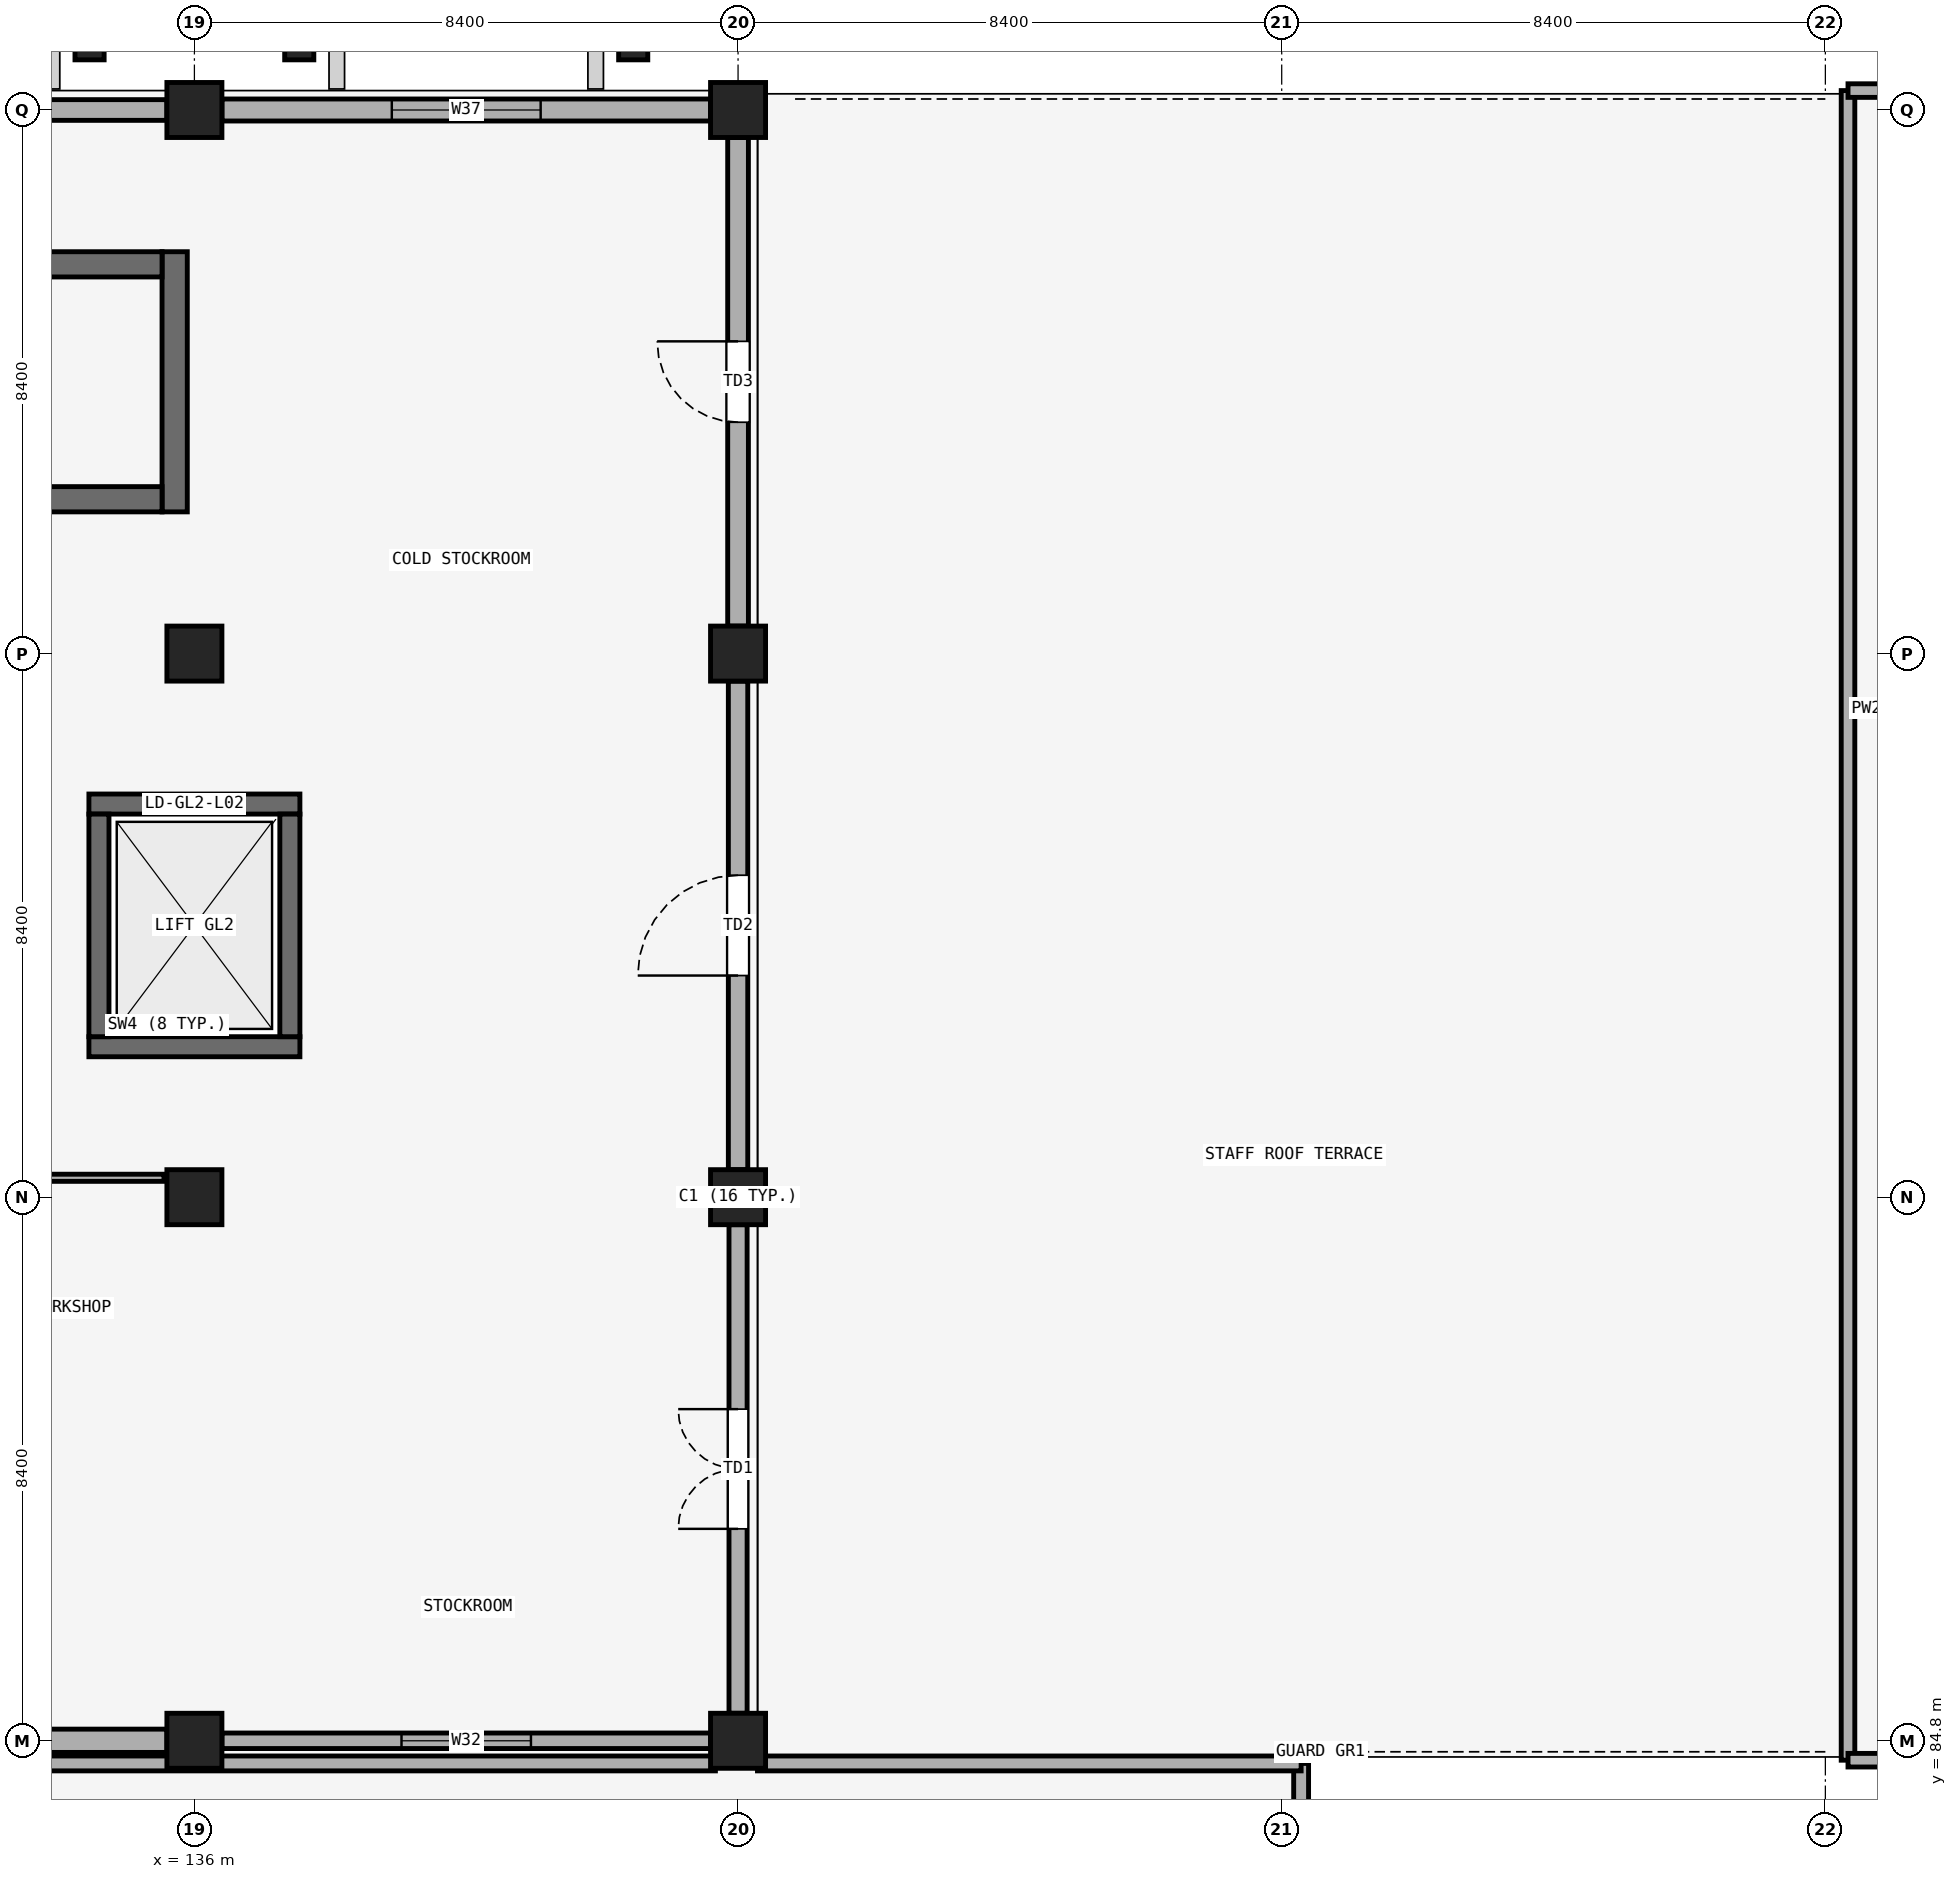
"""IFC4 building model, lengths in metres.
Left out: names, types, materials, properties, quantities, classifications, styles, units other than length and angle.
Written with IfcOpenShell. Run it as: python <this file> out.ifc"""

import sys

from ifc_helpers import new_model, si_unit, direction, frame, frame_2d, origin, origin_2d, place, context, subcontext, project, spatial, rectangle, extrude, element, fill, save


model = new_model("IFC4")
c1 = context("Model", 3, precision=1e-05, world=origin(), true_north=direction((0.0, 1.0)))
c2 = subcontext(c1, "Body", "Model", "MODEL_VIEW")
j1 = project(units=[si_unit("LENGTHUNIT", "METRE"), si_unit("PLANEANGLEUNIT", "RADIAN")], contexts=[c1])
p1 = place(None, origin())
s1 = spatial("IfcSite", under=j1, at=p1, CompositionType="ELEMENT")
p2 = place(p1, origin())
s2 = spatial("IfcBuilding", under=s1, at=p2, CompositionType="ELEMENT")
p3 = place(p2, frame((0.0, 0.0, 9.9)))
s3 = spatial("IfcBuildingStorey", under=s2, at=p3, CompositionType="ELEMENT", Elevation=9.9)
for number, where, z_axis, x_axis in (
    (1, (136.0, 84.8, 0.0), (0.0, 0.0, 1.0), (1.0, 0.0, 0.0)),
    (2, (144.4, 84.8, 0.0), (0.0, 0.0, 1.0), (1.0, 0.0, 0.0)),
    (3, (136.0, 93.2, 0.0), (0.0, 0.0, 1.0), (1.0, 0.0, 0.0)),
    (4, (144.4, 93.2, 0.0), (0.0, 0.0, 1.0), (1.0, 0.0, 0.0)),
    (5, (136.0, 101.6, 0.0), (0.0, 0.0, 1.0), (1.0, 0.0, 0.0)),
    (6, (144.4, 101.6, 0.0), (0.0, 0.0, 1.0), (1.0, 0.0, 0.0)),
    (7, (136.0, 110.0, 0.0), (0.0, 0.0, 1.0), (1.0, 0.0, 0.0)),
    (8, (144.4, 110.0, 0.0), (0.0, 0.0, 1.0), (1.0, 0.0, 0.0)),
):
    element("IfcColumn", number, at=place(p3, frame(where, z_axis=z_axis, x_axis=x_axis)), inside=s3, PredefinedType="COLUMN", context=c2, shape_type="SweptSolid", body=[
        extrude(rectangle(XDim=0.85, YDim=0.85, at=origin_2d()), origin(), (0.0, 0.0, 1.0), 4.5),
    ])
for number, where, z_axis, x_axis in (
    (9, (134.38, 111.05, 0.0), (0.0, 0.0, 1.0), (1.0, 0.0, 0.0)),
    (10, (137.62, 111.05, 0.0), (0.0, 0.0, 1.0), (1.0, 0.0, 0.0)),
    (11, (142.78, 111.05, 0.0), (0.0, 0.0, 1.0), (1.0, 0.0, 0.0)),
):
    element("IfcColumn", number, at=place(p3, frame(where, z_axis=z_axis, x_axis=x_axis)), inside=s3, PredefinedType="PILASTER", context=c2, shape_type="SweptSolid", body=[
        extrude(rectangle(XDim=0.45, YDim=0.55, at=origin_2d()), origin(), (0.0, 0.0, 1.0), 4.5),
    ])
p4 = place(p3, frame((128.025, 84.8, 0.0), z_axis=(0.0, 0.0, 1.0), x_axis=(1.0, 0.0, 0.0)))
e12 = element("IfcWall", 12, at=p4, inside=s3, PredefinedType="SOLIDWALL", context=c2, shape_type="SweptSolid", body=[
    extrude(rectangle(XDim=7.55, YDim=0.36, at=frame_2d((3.775, 0.0))), origin(), (0.0, 0.0, 1.0), 3.45),
])
p5 = place(p4, frame((2.775, 0.0, 0.95)))
e13 = element("IfcOpeningElement", 13, at=p5, cuts=e12, PredefinedType="OPENING", context=c2, shape_type="SweptSolid", body=[
    extrude(rectangle(XDim=2.0, YDim=1.85, at=frame_2d((1.0, 0.925))), frame((0.0, 0.19, 0.0), z_axis=(0.0, -1.0, 0.0), x_axis=(1.0, 0.0, 0.0)), (0.0, 0.0, 1.0), 0.38),
])
p6 = place(p3, frame((136.425, 84.8, 0.0), z_axis=(0.0, 0.0, 1.0), x_axis=(1.0, 0.0, 0.0)))
e14 = element("IfcWall", 14, at=p6, inside=s3, PredefinedType="SOLIDWALL", context=c2, shape_type="SweptSolid", body=[
    extrude(rectangle(XDim=7.55, YDim=0.24, at=frame_2d((3.775, 0.0))), origin(), (0.0, 0.0, 1.0), 3.45),
])
p7 = place(p6, frame((2.775, 0.0, 0.95)))
e15 = element("IfcOpeningElement", 15, at=p7, cuts=e14, PredefinedType="OPENING", context=c2, shape_type="SweptSolid", body=[
    extrude(rectangle(XDim=2.0, YDim=2.1, at=frame_2d((1.0, 1.05))), frame((0.0, 0.13, 0.0), z_axis=(0.0, -1.0, 0.0), x_axis=(1.0, 0.0, 0.0)), (0.0, 0.0, 1.0), 0.26),
])
p8 = place(p3, frame((128.025, 110.0, 0.0), z_axis=(0.0, 0.0, 1.0), x_axis=(1.0, 0.0, 0.0)))
e16 = element("IfcWall", 16, at=p8, inside=s3, PredefinedType="SOLIDWALL", context=c2, shape_type="SweptSolid", body=[
    extrude(rectangle(XDim=7.55, YDim=0.32, at=frame_2d((3.775, 0.0))), origin(), (0.0, 0.0, 1.0), 3.45),
])
p9 = place(p8, frame((2.7, 0.0, 0.95)))
e17 = element("IfcOpeningElement", 17, at=p9, cuts=e16, PredefinedType="OPENING", context=c2, shape_type="SweptSolid", body=[
    extrude(rectangle(XDim=2.15, YDim=2.1, at=frame_2d((1.075, 1.05))), frame((0.0, 0.17, 0.0), z_axis=(0.0, -1.0, 0.0), x_axis=(1.0, 0.0, 0.0)), (0.0, 0.0, 1.0), 0.34),
])
p10 = place(p3, frame((136.425, 110.0, 0.0), z_axis=(0.0, 0.0, 1.0), x_axis=(1.0, 0.0, 0.0)))
e18 = element("IfcWall", 18, at=p10, inside=s3, PredefinedType="SOLIDWALL", context=c2, shape_type="SweptSolid", body=[
    extrude(rectangle(XDim=7.55, YDim=0.34, at=frame_2d((3.775, 0.0))), origin(), (0.0, 0.0, 1.0), 3.45),
])
p11 = place(p10, frame((2.625, 0.0, 0.95)))
e19 = element("IfcOpeningElement", 19, at=p11, cuts=e18, PredefinedType="OPENING", context=c2, shape_type="SweptSolid", body=[
    extrude(rectangle(XDim=2.3, YDim=1.35, at=frame_2d((1.15, 0.675))), frame((0.0, 0.18, 0.0), z_axis=(0.0, -1.0, 0.0), x_axis=(1.0, 0.0, 0.0)), (0.0, 0.0, 1.0), 0.36),
])
p12 = place(p3, frame((144.4, 85.225, 0.0), z_axis=(0.0, 0.0, 1.0), x_axis=(0.0, 1.0, 0.0)))
e20 = element("IfcWall", 20, at=p12, inside=s3, PredefinedType="SOLIDWALL", context=c2, shape_type="SweptSolid", body=[
    extrude(rectangle(XDim=7.55, YDim=0.28, at=frame_2d((3.775, 0.0))), origin(), (0.0, 0.0, 1.0), 3.45),
])
p13 = place(p12, frame((2.85, 0.0, 0.0)))
e21 = element("IfcOpeningElement", 21, at=p13, cuts=e20, PredefinedType="OPENING", context=c2, shape_type="SweptSolid", body=[
    extrude(rectangle(XDim=1.85, YDim=2.3, at=frame_2d((0.925, 1.15))), frame((0.0, 0.15, 0.0), z_axis=(0.0, -1.0, 0.0), x_axis=(1.0, 0.0, 0.0)), (0.0, 0.0, 1.0), 0.3),
])
p14 = place(p3, frame((144.4, 93.625, 0.0), z_axis=(0.0, 0.0, 1.0), x_axis=(0.0, 1.0, 0.0)))
e22 = element("IfcWall", 22, at=p14, inside=s3, PredefinedType="SOLIDWALL", context=c2, shape_type="SweptSolid", body=[
    extrude(rectangle(XDim=7.55, YDim=0.3, at=frame_2d((3.775, 0.0))), origin(), (0.0, 0.0, 1.0), 3.45),
])
p15 = place(p14, frame((3.0, 0.0, 0.0)))
e23 = element("IfcOpeningElement", 23, at=p15, cuts=e22, PredefinedType="OPENING", context=c2, shape_type="SweptSolid", body=[
    extrude(rectangle(XDim=1.55, YDim=2.25, at=frame_2d((0.775, 1.125))), frame((0.0, 0.16, 0.0), z_axis=(0.0, -1.0, 0.0), x_axis=(1.0, 0.0, 0.0)), (0.0, 0.0, 1.0), 0.32),
])
p16 = place(p3, frame((144.4, 102.025, 0.0), z_axis=(0.0, 0.0, 1.0), x_axis=(0.0, 1.0, 0.0)))
e24 = element("IfcWall", 24, at=p16, inside=s3, PredefinedType="SOLIDWALL", context=c2, shape_type="SweptSolid", body=[
    extrude(rectangle(XDim=7.55, YDim=0.32, at=frame_2d((3.775, 0.0))), origin(), (0.0, 0.0, 1.0), 3.45),
])
p17 = place(p16, frame((3.15, 0.0, 0.0)))
e25 = element("IfcOpeningElement", 25, at=p17, cuts=e24, PredefinedType="OPENING", context=c2, shape_type="SweptSolid", body=[
    extrude(rectangle(XDim=1.25, YDim=2.2, at=frame_2d((0.625, 1.1))), frame((0.0, 0.17, 0.0), z_axis=(0.0, -1.0, 0.0), x_axis=(1.0, 0.0, 0.0)), (0.0, 0.0, 1.0), 0.34),
])
p18 = place(p3, frame((153.1, 76.1, 0.0), z_axis=(0.0, 0.0, 1.0), x_axis=(0.0, 1.0, 0.0)))
e26 = element("IfcWall", 26, at=p18, inside=s3, PredefinedType="PARAPET", context=c2, shape_type="SweptSolid", body=[
    extrude(rectangle(XDim=8.35, YDim=0.23, at=frame_2d((4.175, 0.0))), origin(), (0.0, 0.0, 1.0), 0.95),
])
p19 = place(p3, frame((153.1, 84.45, 0.0), z_axis=(0.0, 0.0, 1.0), x_axis=(-1.0, 0.0, 0.0)))
e27 = element("IfcWall", 27, at=p19, inside=s3, PredefinedType="PARAPET", context=c2, shape_type="SweptSolid", body=[
    extrude(rectangle(XDim=8.4, YDim=0.23, at=frame_2d((4.2, 0.0))), origin(), (0.0, 0.0, 1.0), 0.95),
])
p20 = place(p3, frame((144.05, 84.45, 0.0), z_axis=(0.0, 0.0, 1.0), x_axis=(-1.0, 0.0, 0.0)))
e28 = element("IfcWall", 28, at=p20, inside=s3, PredefinedType="PARAPET", context=c2, shape_type="SweptSolid", body=[
    extrude(rectangle(XDim=41.95, YDim=0.23, at=frame_2d((20.975, 0.0))), origin(), (0.0, 0.0, 1.0), 0.95),
])
p21 = place(p3, frame((161.55, 110.3, 0.0), z_axis=(0.0, 0.0, 1.0), x_axis=(0.0, -1.0, 0.0)))
e29 = element("IfcWall", 29, at=p21, inside=s3, PredefinedType="PARAPET", context=c2, shape_type="SweptSolid", body=[
    extrude(rectangle(XDim=25.8, YDim=0.21, at=frame_2d((12.9, 0.0))), origin(), (0.0, 0.0, 1.0), 0.95),
])
for number, where, z_axis, x_axis in (
    (30, (161.55, 84.5, 0.0), (0.0, 0.0, 1.0), (1.0, 0.0, 0.0)),
    (31, (169.9, 110.3, 0.0), (0.0, 0.0, 1.0), (-1.0, 0.0, 0.0)),
):
    element("IfcWall", number, at=place(p3, frame(where, z_axis=z_axis, x_axis=x_axis)), inside=s3, PredefinedType="PARAPET", context=c2, shape_type="SweptSolid", body=[
        extrude(rectangle(XDim=8.35, YDim=0.21, at=frame_2d((4.175, 0.0))), origin(), (0.0, 0.0, 1.0), 0.95),
    ])
p22 = place(p3, frame((135.695, 103.79, 0.0), z_axis=(0.0, 0.0, 1.0), x_axis=(0.0, 1.0, 0.0)))
e32 = element("IfcWall", 32, at=p22, inside=s3, PredefinedType="SHEAR", context=c2, shape_type="SweptSolid", body=[
    extrude(rectangle(XDim=4.02, YDim=0.39, at=frame_2d((2.01, 0.0))), origin(), (0.0, 0.0, 1.0), 4.2),
])
for number, where, z_axis, x_axis in (
    (33, (128.1, 103.985, 0.0), (0.0, 0.0, 1.0), (1.0, 0.0, 0.0)),
    (34, (128.1, 107.615, 0.0), (0.0, 0.0, 1.0), (1.0, 0.0, 0.0)),
):
    element("IfcWall", number, at=place(p3, frame(where, z_axis=z_axis, x_axis=x_axis)), inside=s3, PredefinedType="SHEAR", context=c2, shape_type="SweptSolid", body=[
        extrude(rectangle(XDim=7.4, YDim=0.39, at=frame_2d((3.7, 0.0))), origin(), (0.0, 0.0, 1.0), 4.2),
    ])
p23 = place(p3, frame((134.37, 95.525, 0.0), z_axis=(0.0, 0.0, 1.0), x_axis=(1.0, 0.0, 0.0)))
e35 = element("IfcWall", 35, at=p23, inside=s3, PredefinedType="SHEAR", context=c2, shape_type="SweptSolid", body=[
    extrude(rectangle(XDim=3.26, YDim=0.31, at=frame_2d((1.63, 0.0))), origin(), (0.0, 0.0, 1.0), 4.2),
])
p24 = place(p3, frame((134.37, 99.275, 0.0), z_axis=(0.0, 0.0, 1.0), x_axis=(1.0, 0.0, 0.0)))
e36 = element("IfcWall", 36, at=p24, inside=s3, PredefinedType="SHEAR", context=c2, shape_type="SweptSolid", body=[
    extrude(rectangle(XDim=3.26, YDim=0.31, at=frame_2d((1.63, 0.0))), origin(), (0.0, 0.0, 1.0), 4.2),
])
p25 = place(p24, frame((0.88, 0.0, 0.0)))
e37 = element("IfcOpeningElement", 37, at=p25, cuts=e36, PredefinedType="OPENING", context=c2, shape_type="SweptSolid", body=[
    extrude(rectangle(XDim=1.5, YDim=2.35, at=frame_2d((0.75, 1.175))), frame((0.0, 0.165, 0.0), z_axis=(0.0, -1.0, 0.0), x_axis=(1.0, 0.0, 0.0)), (0.0, 0.0, 1.0), 0.33),
])
for number, where, z_axis, x_axis in (
    (38, (134.525, 95.68, 0.0), (0.0, 0.0, 1.0), (0.0, 1.0, 0.0)),
    (39, (137.475, 95.68, 0.0), (0.0, 0.0, 1.0), (0.0, 1.0, 0.0)),
):
    element("IfcWall", number, at=place(p3, frame(where, z_axis=z_axis, x_axis=x_axis)), inside=s3, PredefinedType="SHEAR", context=c2, shape_type="SweptSolid", body=[
        extrude(rectangle(XDim=3.44, YDim=0.31, at=frame_2d((1.72, 0.0))), origin(), (0.0, 0.0, 1.0), 4.2),
    ])
p26 = place(p3, frame((125.27, 93.5, 0.0), z_axis=(0.0, 0.0, 1.0), x_axis=(1.0, 0.0, 0.0)))
e40 = element("IfcWall", 40, at=p26, inside=s3, PredefinedType="PARTITIONING", context=c2, shape_type="SweptSolid", body=[
    extrude(rectangle(XDim=10.26, YDim=0.11, at=frame_2d((5.13, 0.0))), origin(), (0.0, 0.0, 1.0), 3.5),
])
p27 = place(p26, frame((4.45, 0.0, 0.0)))
e41 = element("IfcOpeningElement", 41, at=p27, cuts=e40, PredefinedType="OPENING", context=c2, shape_type="SweptSolid", body=[
    extrude(rectangle(XDim=1.36, YDim=2.22, at=frame_2d((0.68, 1.11))), frame((0.0, 0.065, 0.0), z_axis=(0.0, -1.0, 0.0), x_axis=(1.0, 0.0, 0.0)), (0.0, 0.0, 1.0), 0.13),
])
p28 = place(p7, origin())
e42 = element("IfcWindow", 42, at=p28, inside=s3, PartitioningType="DOUBLE_PANEL_VERTICAL", PredefinedType="WINDOW", context=c2, shape_type="SweptSolid", body=[
    extrude(rectangle(XDim=2.0, YDim=2.1, at=frame_2d((1.0, 1.05))), frame((0.0, 0.03, 0.0), z_axis=(0.0, -1.0, 0.0), x_axis=(1.0, 0.0, 0.0)), (0.0, 0.0, 1.0), 0.06),
])
fill(e15, e42)
p29 = place(p11, origin())
e43 = element("IfcWindow", 43, at=p29, inside=s3, PartitioningType="DOUBLE_PANEL_VERTICAL", PredefinedType="WINDOW", context=c2, shape_type="SweptSolid", body=[
    extrude(rectangle(XDim=2.3, YDim=1.35, at=frame_2d((1.15, 0.675))), frame((0.0, 0.03, 0.0), z_axis=(0.0, -1.0, 0.0), x_axis=(1.0, 0.0, 0.0)), (0.0, 0.0, 1.0), 0.06),
])
fill(e19, e43)
p30 = place(p13, origin())
e44 = element("IfcDoor", 44, at=p30, inside=s3, OperationType="DOUBLE_DOOR_SINGLE_SWING", PredefinedType="DOOR", context=c2, shape_type="SweptSolid", body=[
    extrude(rectangle(XDim=1.85, YDim=2.3, at=frame_2d((0.925, 1.15))), frame((0.0, 0.025, 0.0), z_axis=(0.0, -1.0, 0.0), x_axis=(1.0, 0.0, 0.0)), (0.0, 0.0, 1.0), 0.05),
])
fill(e21, e44)
p31 = place(p15, origin())
e45 = element("IfcDoor", 45, at=p31, inside=s3, OperationType="SINGLE_SWING_LEFT", PredefinedType="DOOR", context=c2, shape_type="SweptSolid", body=[
    extrude(rectangle(XDim=1.55, YDim=2.25, at=frame_2d((0.775, 1.125))), frame((0.0, 0.025, 0.0), z_axis=(0.0, -1.0, 0.0), x_axis=(1.0, 0.0, 0.0)), (0.0, 0.0, 1.0), 0.05),
])
fill(e23, e45)
p32 = place(p17, origin())
e46 = element("IfcDoor", 46, at=p32, inside=s3, OperationType="SINGLE_SWING_RIGHT", PredefinedType="DOOR", context=c2, shape_type="SweptSolid", body=[
    extrude(rectangle(XDim=1.25, YDim=2.2, at=frame_2d((0.625, 1.1))), frame((0.0, 0.025, 0.0), z_axis=(0.0, -1.0, 0.0), x_axis=(1.0, 0.0, 0.0)), (0.0, 0.0, 1.0), 0.05),
])
fill(e25, e46)
p33 = place(p25, origin())
e47 = element("IfcDoor", 47, at=p33, inside=s3, OperationType="SLIDING_TO_LEFT", PredefinedType="DOOR", context=c2, shape_type="SweptSolid", body=[
    extrude(rectangle(XDim=1.5, YDim=2.35, at=frame_2d((0.75, 1.175))), frame((0.0, 0.025, 0.0), z_axis=(0.0, -1.0, 0.0), x_axis=(1.0, 0.0, 0.0)), (0.0, 0.0, 1.0), 0.05),
])
fill(e37, e47)
save(model, sys.argv[1])
